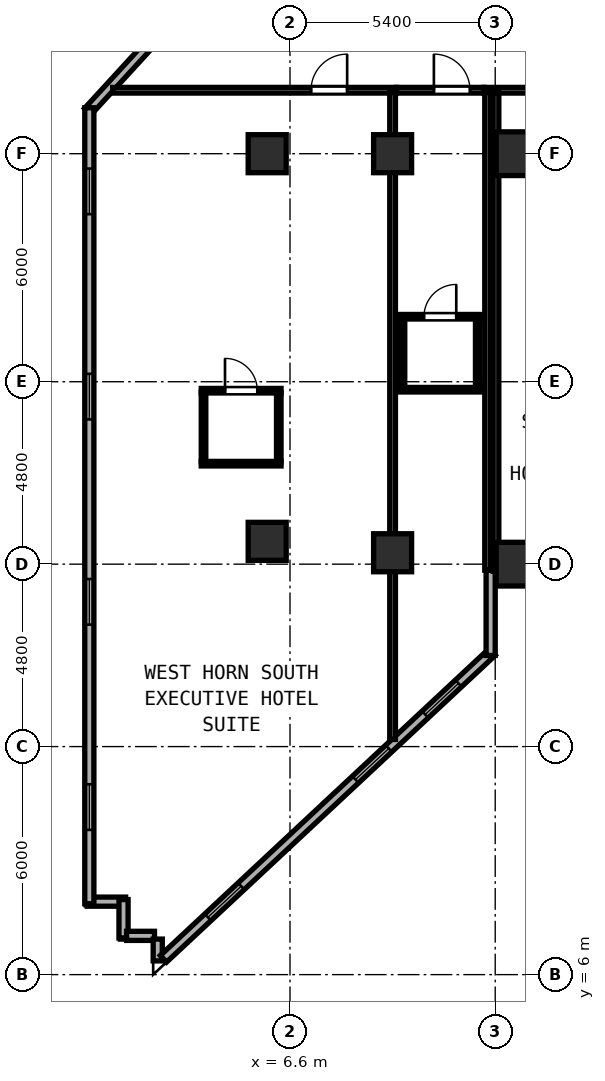
"""IFC4 building model, lengths in metres.
Left out: names, types, materials, properties, quantities, classifications, styles, units other than length and angle.
Written with IfcOpenShell. Run it as: python <this file> out.ifc"""

import sys

from ifc_helpers import new_model, si_unit, direction, frame, frame_2d, origin, origin_2d, place, context, subcontext, project, spatial, rectangle, hollow_rectangle, extrude, element, fill, save


model = new_model("IFC4")
c1 = context("Model", 3, precision=1e-05, world=origin(), true_north=direction((0.0, 1.0)))
c2 = subcontext(c1, "Body", "Model", "MODEL_VIEW")
j1 = project(units=[si_unit("LENGTHUNIT", "METRE"), si_unit("PLANEANGLEUNIT", "RADIAN")], contexts=[c1])
p1 = place(None, origin())
s1 = spatial("IfcSite", under=j1, at=p1, CompositionType="ELEMENT")
p2 = place(p1, origin())
s2 = spatial("IfcBuilding", under=s1, at=p2, CompositionType="ELEMENT")
p3 = place(p2, frame((0.0, 0.0, 62.8)))
s3 = spatial("IfcBuildingStorey", under=s2, at=p3, CompositionType="ELEMENT", Elevation=62.8)
for number, where, z_axis, x_axis in (
    (1, (12.6, 16.8, 0.0), (0.0, 0.0, 1.0), (1.0, 0.0, 0.0)),
    (2, (12.6, 27.6, 0.0), (0.0, 0.0, 1.0), (1.0, 0.0, 0.0)),
):
    element("IfcColumn", number, at=place(p3, frame(where, z_axis=z_axis, x_axis=x_axis)), inside=s3, PredefinedType="COLUMN", context=c2, shape_type="SweptSolid", body=[
        extrude(hollow_rectangle(XDim=1.15, YDim=1.15, WallThickness=0.042, at=origin_2d()), origin(), (0.0, 0.0, 1.0), 3.8),
    ])
for number, where, z_axis, x_axis in (
    (3, (6.0, 17.4, 0.0), (0.0, 0.0, 1.0), (1.0, 0.0, 0.0)),
    (4, (6.0, 27.6, 0.0), (0.0, 0.0, 1.0), (1.0, 0.0, 0.0)),
    (5, (9.3, 17.1, 0.0), (0.0, 0.0, 1.0), (1.0, 0.0, 0.0)),
    (6, (9.3, 27.6, 0.0), (0.0, 0.0, 1.0), (1.0, 0.0, 0.0)),
):
    element("IfcColumn", number, at=place(p3, frame(where, z_axis=z_axis, x_axis=x_axis)), inside=s3, PredefinedType="COLUMN", context=c2, shape_type="SweptSolid", body=[
        extrude(hollow_rectangle(XDim=1.0, YDim=1.0, WallThickness=0.038, at=origin_2d()), origin(), (0.0, 0.0, 1.0), 3.8),
    ])
for number, where, z_axis, x_axis in (
    (7, (1.265, 7.92, 0.0), (0.0, 0.0, 1.0), (1.0, 0.0, 0.0)),
    (8, (2.22, 7.975, 0.0), (0.0, 0.0, 1.0), (0.0, -1.0, 0.0)),
):
    element("IfcWall", number, at=place(p3, frame(where, z_axis=z_axis, x_axis=x_axis)), inside=s3, PredefinedType="SOLIDWALL", context=c2, shape_type="SweptSolid", body=[
        extrude(rectangle(XDim=1.01, YDim=0.24, at=frame_2d((0.505, 0.0))), origin(), (0.0, 0.0, 1.0), 3.6),
    ])
p4 = place(p3, frame((2.3, 7.02, 0.0), z_axis=(0.0, 0.0, 1.0), x_axis=(1.0, 0.0, 0.0)))
e9 = element("IfcWall", 9, at=p4, inside=s3, PredefinedType="SOLIDWALL", context=c2, shape_type="SweptSolid", body=[
    extrude(rectangle(XDim=0.735, YDim=0.24, at=frame_2d((0.367, 0.0))), origin(), (0.0, 0.0, 1.0), 3.6),
])
p5 = place(p3, frame((3.12, 6.935, 0.0), z_axis=(0.0, 0.0, 1.0), x_axis=(0.0, -1.0, 0.0)))
e10 = element("IfcWall", 10, at=p5, inside=s3, PredefinedType="SOLIDWALL", context=c2, shape_type="SweptSolid", body=[
    extrude(rectangle(XDim=0.574, YDim=0.24, at=frame_2d((0.287, 0.0))), origin(), (0.0, 0.0, 1.0), 3.6),
])
p6 = place(p3, frame((3.27, 6.416, 0.0), z_axis=(0.0, 0.0, 1.0), x_axis=(0.731064187858, 0.682308693505, 0.0)))
e11 = element("IfcWall", 11, at=p6, inside=s3, PredefinedType="SOLIDWALL", context=c2, shape_type="SweptSolid", body=[
    extrude(rectangle(XDim=11.833, YDim=0.24, at=frame_2d((5.916, 0.0))), origin(), (0.0, 0.0, 1.0), 3.6),
])
p7 = place(p6, frame((1.6, 0.0, 0.85)))
e12 = element("IfcOpeningElement", 12, at=p7, cuts=e11, PredefinedType="OPENING", context=c2, shape_type="SweptSolid", body=[
    extrude(rectangle(XDim=1.2, YDim=1.85, at=frame_2d((0.6, 0.925))), frame((0.0, 0.13, 0.0), z_axis=(0.0, -1.0, 0.0), x_axis=(1.0, 0.0, 0.0)), (0.0, 0.0, 1.0), 0.26),
])
p8 = place(p6, frame((6.912, 0.0, 0.85)))
e13 = element("IfcOpeningElement", 13, at=p8, cuts=e11, PredefinedType="OPENING", context=c2, shape_type="SweptSolid", body=[
    extrude(rectangle(XDim=1.2, YDim=1.85, at=frame_2d((0.6, 0.925))), frame((0.0, 0.13, 0.0), z_axis=(0.0, -1.0, 0.0), x_axis=(1.0, 0.0, 0.0)), (0.0, 0.0, 1.0), 0.26),
])
p9 = place(p6, frame((9.421, 0.0, 0.85)))
e14 = element("IfcOpeningElement", 14, at=p9, cuts=e11, PredefinedType="OPENING", context=c2, shape_type="SweptSolid", body=[
    extrude(rectangle(XDim=1.2, YDim=1.85, at=frame_2d((0.6, 0.925))), frame((0.0, 0.13, 0.0), z_axis=(0.0, -1.0, 0.0), x_axis=(1.0, 0.0, 0.0)), (0.0, 0.0, 1.0), 0.26),
])
p10 = place(p3, frame((11.88, 14.397, 0.0), z_axis=(0.0, 0.0, 1.0), x_axis=(0.0, 1.0, 0.0)))
e15 = element("IfcWall", 15, at=p10, inside=s3, PredefinedType="SOLIDWALL", context=c2, shape_type="SweptSolid", body=[
    extrude(rectangle(XDim=2.243, YDim=0.24, at=frame_2d((1.121, 0.0))), origin(), (0.0, 0.0, 1.0), 3.6),
])
p11 = place(p3, frame((3.502, 31.134, 0.0), z_axis=(0.0, 0.0, 1.0), x_axis=(-0.675781844312, -0.737101688302, 0.0)))
e16 = element("IfcWall", 16, at=p11, inside=s3, PredefinedType="SOLIDWALL", context=c2, shape_type="SweptSolid", body=[
    extrude(rectangle(XDim=3.285, YDim=0.24, at=frame_2d((1.642, 0.0))), origin(), (0.0, 0.0, 1.0), 3.6),
])
p12 = place(p3, frame((1.32, 28.808, 0.0), z_axis=(0.0, 0.0, 1.0), x_axis=(0.0, -1.0, 0.0)))
e17 = element("IfcWall", 17, at=p12, inside=s3, PredefinedType="SOLIDWALL", context=c2, shape_type="SweptSolid", body=[
    extrude(rectangle(XDim=20.943, YDim=0.24, at=frame_2d((10.472, 0.0))), origin(), (0.0, 0.0, 1.0), 3.6),
])
p13 = place(p12, frame((1.6, 0.0, 0.85)))
e18 = element("IfcOpeningElement", 18, at=p13, cuts=e17, PredefinedType="OPENING", context=c2, shape_type="SweptSolid", body=[
    extrude(rectangle(XDim=1.2, YDim=1.85, at=frame_2d((0.6, 0.925))), frame((0.0, 0.13, 0.0), z_axis=(0.0, -1.0, 0.0), x_axis=(1.0, 0.0, 0.0)), (0.0, 0.0, 1.0), 0.26),
])
p14 = place(p12, frame((7.0, 0.0, 0.85)))
e19 = element("IfcOpeningElement", 19, at=p14, cuts=e17, PredefinedType="OPENING", context=c2, shape_type="SweptSolid", body=[
    extrude(rectangle(XDim=1.2, YDim=1.85, at=frame_2d((0.6, 0.925))), frame((0.0, 0.13, 0.0), z_axis=(0.0, -1.0, 0.0), x_axis=(1.0, 0.0, 0.0)), (0.0, 0.0, 1.0), 0.26),
])
p15 = place(p12, frame((12.4, 0.0, 0.85)))
e20 = element("IfcOpeningElement", 20, at=p15, cuts=e17, PredefinedType="OPENING", context=c2, shape_type="SweptSolid", body=[
    extrude(rectangle(XDim=1.2, YDim=1.85, at=frame_2d((0.6, 0.925))), frame((0.0, 0.13, 0.0), z_axis=(0.0, -1.0, 0.0), x_axis=(1.0, 0.0, 0.0)), (0.0, 0.0, 1.0), 0.26),
])
p16 = place(p12, frame((17.8, 0.0, 0.85)))
e21 = element("IfcOpeningElement", 21, at=p16, cuts=e17, PredefinedType="OPENING", context=c2, shape_type="SweptSolid", body=[
    extrude(rectangle(XDim=1.2, YDim=1.85, at=frame_2d((0.6, 0.925))), frame((0.0, 0.13, 0.0), z_axis=(0.0, -1.0, 0.0), x_axis=(1.0, 0.0, 0.0)), (0.0, 0.0, 1.0), 0.26),
])
p17 = place(p3, frame((11.7, 29.27, 0.0), z_axis=(0.0, 0.0, 1.0), x_axis=(1.0, 0.0, 0.0)))
e22 = element("IfcWall", 22, at=p17, inside=s3, PredefinedType="PARTITIONING", context=c2, shape_type="SweptSolid", body=[
    extrude(rectangle(XDim=4.84, YDim=0.15, at=frame_2d((2.42, 0.0))), origin(), (0.0, 0.0, 1.0), 3.6),
])
p18 = place(p17, frame((4.552, 0.0, 0.0), z_axis=(0.0, 0.0, 1.0), x_axis=(-1.0, 0.0, 0.0)))
e23 = element("IfcOpeningElement", 23, at=p18, cuts=e22, PredefinedType="OPENING", context=c2, shape_type="SweptSolid", body=[
    extrude(rectangle(XDim=0.95, YDim=2.15, at=frame_2d((0.475, 1.075))), frame((0.0, 0.085, 0.0), z_axis=(0.0, -1.0, 0.0), x_axis=(1.0, 0.0, 0.0)), (0.0, 0.0, 1.0), 0.17),
])
p19 = place(p3, frame((11.8, 16.642, 0.0), z_axis=(0.0, 0.0, 1.0), x_axis=(0.0, 1.0, 0.0)))
e24 = element("IfcWall", 24, at=p19, inside=s3, PredefinedType="PARTITIONING", context=c2, shape_type="SweptSolid", body=[
    extrude(rectangle(XDim=12.568, YDim=0.15, at=frame_2d((6.284, 0.0))), origin(), (0.0, 0.0, 1.0), 3.6),
])
p20 = place(p3, frame((1.936, 29.27, 0.0), z_axis=(0.0, 0.0, 1.0), x_axis=(1.0, 0.0, 0.0)))
e25 = element("IfcWall", 25, at=p20, inside=s3, PredefinedType="PARTITIONING", context=c2, shape_type="SweptSolid", body=[
    extrude(rectangle(XDim=7.464, YDim=0.15, at=frame_2d((3.732, 0.0))), origin(), (0.0, 0.0, 1.0), 3.6),
])
p21 = place(p20, frame((6.168, 0.0, 0.0), z_axis=(0.0, 0.0, 1.0), x_axis=(-1.0, 0.0, 0.0)))
e26 = element("IfcOpeningElement", 26, at=p21, cuts=e25, PredefinedType="OPENING", context=c2, shape_type="SweptSolid", body=[
    extrude(rectangle(XDim=0.95, YDim=2.18, at=frame_2d((0.475, 1.09))), frame((0.0, 0.085, 0.0), z_axis=(0.0, -1.0, 0.0), x_axis=(1.0, 0.0, 0.0)), (0.0, 0.0, 1.0), 0.17),
])
p22 = place(p3, frame((9.3, 12.188, 0.0), z_axis=(0.0, 0.0, 1.0), x_axis=(0.0, 1.0, 0.0)))
e27 = element("IfcWall", 27, at=p22, inside=s3, PredefinedType="PARTITIONING", context=c2, shape_type="SweptSolid", body=[
    extrude(rectangle(XDim=17.022, YDim=0.15, at=frame_2d((8.511, 0.0))), origin(), (0.0, 0.0, 1.0), 3.6),
])
p23 = place(p3, frame((4.265, 21.364, 0.0), z_axis=(0.0, 0.0, 1.0), x_axis=(1.0, 0.0, 0.0)))
e28 = element("IfcWall", 28, at=p23, inside=s3, PredefinedType="PARTITIONING", context=c2, shape_type="SweptSolid", body=[
    extrude(rectangle(XDim=2.1, YDim=0.12, at=frame_2d((1.05, 0.0))), origin(), (0.0, 0.0, 1.0), 3.6),
])
p24 = place(p23, frame((1.475, 0.0, 0.0), z_axis=(0.0, 0.0, 1.0), x_axis=(-1.0, 0.0, 0.0)))
e29 = element("IfcOpeningElement", 29, at=p24, cuts=e28, PredefinedType="OPENING", context=c2, shape_type="SweptSolid", body=[
    extrude(rectangle(XDim=0.85, YDim=2.1, at=frame_2d((0.425, 1.05))), frame((0.0, 0.07, 0.0), z_axis=(0.0, -1.0, 0.0), x_axis=(1.0, 0.0, 0.0)), (0.0, 0.0, 1.0), 0.14),
])
p25 = place(p3, frame((4.265, 19.444, 0.0), z_axis=(0.0, 0.0, 1.0), x_axis=(1.0, 0.0, 0.0)))
e30 = element("IfcWall", 30, at=p25, inside=s3, PredefinedType="PARTITIONING", context=c2, shape_type="SweptSolid", body=[
    extrude(rectangle(XDim=2.1, YDim=0.12, at=frame_2d((1.05, 0.0))), origin(), (0.0, 0.0, 1.0), 3.6),
])
for number, where, z_axis, x_axis in (
    (31, (4.325, 19.489, 0.0), (0.0, 0.0, 1.0), (0.0, 1.0, 0.0)),
    (32, (6.305, 19.489, 0.0), (0.0, 0.0, 1.0), (0.0, 1.0, 0.0)),
):
    element("IfcWall", number, at=place(p3, frame(where, z_axis=z_axis, x_axis=x_axis)), inside=s3, PredefinedType="PARTITIONING", context=c2, shape_type="SweptSolid", body=[
        extrude(rectangle(XDim=1.83, YDim=0.12, at=frame_2d((0.915, 0.0))), origin(), (0.0, 0.0, 1.0), 3.6),
    ])
p26 = place(p3, frame((9.402, 29.27, 0.0), z_axis=(0.0, 0.0, 1.0), x_axis=(1.0, 0.0, 0.0)))
e33 = element("IfcWall", 33, at=p26, inside=s3, PredefinedType="PARTITIONING", context=c2, shape_type="SweptSolid", body=[
    extrude(rectangle(XDim=2.296, YDim=0.15, at=frame_2d((1.148, 0.0))), origin(), (0.0, 0.0, 1.0), 3.6),
])
p27 = place(p26, frame((1.934, 0.0, 0.0), z_axis=(0.0, 0.0, 1.0), x_axis=(-1.0, 0.0, 0.0)))
e34 = element("IfcOpeningElement", 34, at=p27, cuts=e33, PredefinedType="OPENING", context=c2, shape_type="SweptSolid", body=[
    extrude(rectangle(XDim=0.95, YDim=2.15, at=frame_2d((0.475, 1.075))), frame((0.0, 0.085, 0.0), z_axis=(0.0, -1.0, 0.0), x_axis=(1.0, 0.0, 0.0)), (0.0, 0.0, 1.0), 0.17),
])
p28 = place(p3, frame((12.02, 16.612, 0.0), z_axis=(0.0, 0.0, 1.0), x_axis=(0.0, 1.0, 0.0)))
e35 = element("IfcWall", 35, at=p28, inside=s3, PredefinedType="PARTITIONING", context=c2, shape_type="SweptSolid", body=[
    extrude(rectangle(XDim=12.598, YDim=0.15, at=frame_2d((6.299, 0.0))), origin(), (0.0, 0.0, 1.0), 3.6),
])
p29 = place(p3, frame((9.5, 23.31, 0.0), z_axis=(0.0, 0.0, 1.0), x_axis=(1.0, 0.0, 0.0)))
e36 = element("IfcWall", 36, at=p29, inside=s3, PredefinedType="PARTITIONING", context=c2, shape_type="SweptSolid", body=[
    extrude(rectangle(XDim=2.1, YDim=0.12, at=frame_2d((1.05, 0.0))), origin(), (0.0, 0.0, 1.0), 3.6),
])
p30 = place(p29, frame((1.475, 0.0, 0.0), z_axis=(0.0, 0.0, 1.0), x_axis=(-1.0, 0.0, 0.0)))
e37 = element("IfcOpeningElement", 37, at=p30, cuts=e36, PredefinedType="OPENING", context=c2, shape_type="SweptSolid", body=[
    extrude(rectangle(XDim=0.85, YDim=2.1, at=frame_2d((0.425, 1.05))), frame((0.0, 0.07, 0.0), z_axis=(0.0, -1.0, 0.0), x_axis=(1.0, 0.0, 0.0)), (0.0, 0.0, 1.0), 0.14),
])
p31 = place(p3, frame((9.5, 21.39, 0.0), z_axis=(0.0, 0.0, 1.0), x_axis=(1.0, 0.0, 0.0)))
e38 = element("IfcWall", 38, at=p31, inside=s3, PredefinedType="PARTITIONING", context=c2, shape_type="SweptSolid", body=[
    extrude(rectangle(XDim=2.1, YDim=0.12, at=frame_2d((1.05, 0.0))), origin(), (0.0, 0.0, 1.0), 3.6),
])
for number, where, z_axis, x_axis in (
    (39, (9.56, 21.435, 0.0), (0.0, 0.0, 1.0), (0.0, 1.0, 0.0)),
    (40, (11.54, 21.435, 0.0), (0.0, 0.0, 1.0), (0.0, 1.0, 0.0)),
):
    element("IfcWall", number, at=place(p3, frame(where, z_axis=z_axis, x_axis=x_axis)), inside=s3, PredefinedType="PARTITIONING", context=c2, shape_type="SweptSolid", body=[
        extrude(rectangle(XDim=1.83, YDim=0.12, at=frame_2d((0.915, 0.0))), origin(), (0.0, 0.0, 1.0), 3.6),
    ])
p32 = place(p7, origin())
e41 = element("IfcWindow", 41, at=p32, inside=s3, PartitioningType="SINGLE_PANEL", PredefinedType="WINDOW", context=c2, shape_type="SweptSolid", body=[
    extrude(rectangle(XDim=1.2, YDim=1.85, at=frame_2d((0.6, 0.925))), frame((0.0, 0.03, 0.0), z_axis=(0.0, -1.0, 0.0), x_axis=(1.0, 0.0, 0.0)), (0.0, 0.0, 1.0), 0.06),
])
fill(e12, e41)
p33 = place(p8, origin())
e42 = element("IfcWindow", 42, at=p33, inside=s3, PartitioningType="SINGLE_PANEL", PredefinedType="WINDOW", context=c2, shape_type="SweptSolid", body=[
    extrude(rectangle(XDim=1.2, YDim=1.85, at=frame_2d((0.6, 0.925))), frame((0.0, 0.03, 0.0), z_axis=(0.0, -1.0, 0.0), x_axis=(1.0, 0.0, 0.0)), (0.0, 0.0, 1.0), 0.06),
])
fill(e13, e42)
p34 = place(p13, origin())
e43 = element("IfcWindow", 43, at=p34, inside=s3, PartitioningType="SINGLE_PANEL", PredefinedType="WINDOW", context=c2, shape_type="SweptSolid", body=[
    extrude(rectangle(XDim=1.2, YDim=1.85, at=frame_2d((0.6, 0.925))), frame((0.0, 0.03, 0.0), z_axis=(0.0, -1.0, 0.0), x_axis=(1.0, 0.0, 0.0)), (0.0, 0.0, 1.0), 0.06),
])
fill(e18, e43)
p35 = place(p14, origin())
e44 = element("IfcWindow", 44, at=p35, inside=s3, PartitioningType="SINGLE_PANEL", PredefinedType="WINDOW", context=c2, shape_type="SweptSolid", body=[
    extrude(rectangle(XDim=1.2, YDim=1.85, at=frame_2d((0.6, 0.925))), frame((0.0, 0.03, 0.0), z_axis=(0.0, -1.0, 0.0), x_axis=(1.0, 0.0, 0.0)), (0.0, 0.0, 1.0), 0.06),
])
fill(e19, e44)
p36 = place(p15, origin())
e45 = element("IfcWindow", 45, at=p36, inside=s3, PartitioningType="SINGLE_PANEL", PredefinedType="WINDOW", context=c2, shape_type="SweptSolid", body=[
    extrude(rectangle(XDim=1.2, YDim=1.85, at=frame_2d((0.6, 0.925))), frame((0.0, 0.03, 0.0), z_axis=(0.0, -1.0, 0.0), x_axis=(1.0, 0.0, 0.0)), (0.0, 0.0, 1.0), 0.06),
])
fill(e20, e45)
p37 = place(p16, origin())
e46 = element("IfcWindow", 46, at=p37, inside=s3, PartitioningType="SINGLE_PANEL", PredefinedType="WINDOW", context=c2, shape_type="SweptSolid", body=[
    extrude(rectangle(XDim=1.2, YDim=1.85, at=frame_2d((0.6, 0.925))), frame((0.0, 0.03, 0.0), z_axis=(0.0, -1.0, 0.0), x_axis=(1.0, 0.0, 0.0)), (0.0, 0.0, 1.0), 0.06),
])
fill(e21, e46)
p38 = place(p21, origin())
e47 = element("IfcDoor", 47, at=p38, inside=s3, OperationType="SINGLE_SWING_LEFT", PredefinedType="DOOR", context=c2, shape_type="SweptSolid", body=[
    extrude(rectangle(XDim=0.95, YDim=2.18, at=frame_2d((0.475, 1.09))), frame((0.0, 0.025, 0.0), z_axis=(0.0, -1.0, 0.0), x_axis=(1.0, 0.0, 0.0)), (0.0, 0.0, 1.0), 0.05),
])
fill(e26, e47)
p39 = place(p24, origin())
e48 = element("IfcDoor", 48, at=p39, inside=s3, OperationType="SINGLE_SWING_RIGHT", PredefinedType="DOOR", context=c2, shape_type="SweptSolid", body=[
    extrude(rectangle(XDim=0.85, YDim=2.1, at=frame_2d((0.425, 1.05))), frame((0.0, 0.025, 0.0), z_axis=(0.0, -1.0, 0.0), x_axis=(1.0, 0.0, 0.0)), (0.0, 0.0, 1.0), 0.05),
])
fill(e29, e48)
p40 = place(p27, origin())
e49 = element("IfcDoor", 49, at=p40, inside=s3, OperationType="SINGLE_SWING_RIGHT", PredefinedType="DOOR", context=c2, shape_type="SweptSolid", body=[
    extrude(rectangle(XDim=0.95, YDim=2.15, at=frame_2d((0.475, 1.075))), frame((0.0, 0.025, 0.0), z_axis=(0.0, -1.0, 0.0), x_axis=(1.0, 0.0, 0.0)), (0.0, 0.0, 1.0), 0.05),
])
fill(e34, e49)
p41 = place(p30, origin())
e50 = element("IfcDoor", 50, at=p41, inside=s3, OperationType="SINGLE_SWING_LEFT", PredefinedType="DOOR", context=c2, shape_type="SweptSolid", body=[
    extrude(rectangle(XDim=0.85, YDim=2.1, at=frame_2d((0.425, 1.05))), frame((0.0, 0.025, 0.0), z_axis=(0.0, -1.0, 0.0), x_axis=(1.0, 0.0, 0.0)), (0.0, 0.0, 1.0), 0.05),
])
fill(e37, e50)
p42 = place(p9, origin())
e51 = element("IfcWindow", 51, at=p42, inside=s3, PartitioningType="SINGLE_PANEL", PredefinedType="WINDOW", context=c2, shape_type="SweptSolid", body=[
    extrude(rectangle(XDim=1.2, YDim=1.85, at=frame_2d((0.6, 0.925))), frame((0.0, 0.03, 0.0), z_axis=(0.0, -1.0, 0.0), x_axis=(1.0, 0.0, 0.0)), (0.0, 0.0, 1.0), 0.06),
])
fill(e14, e51)
save(model, sys.argv[1])
